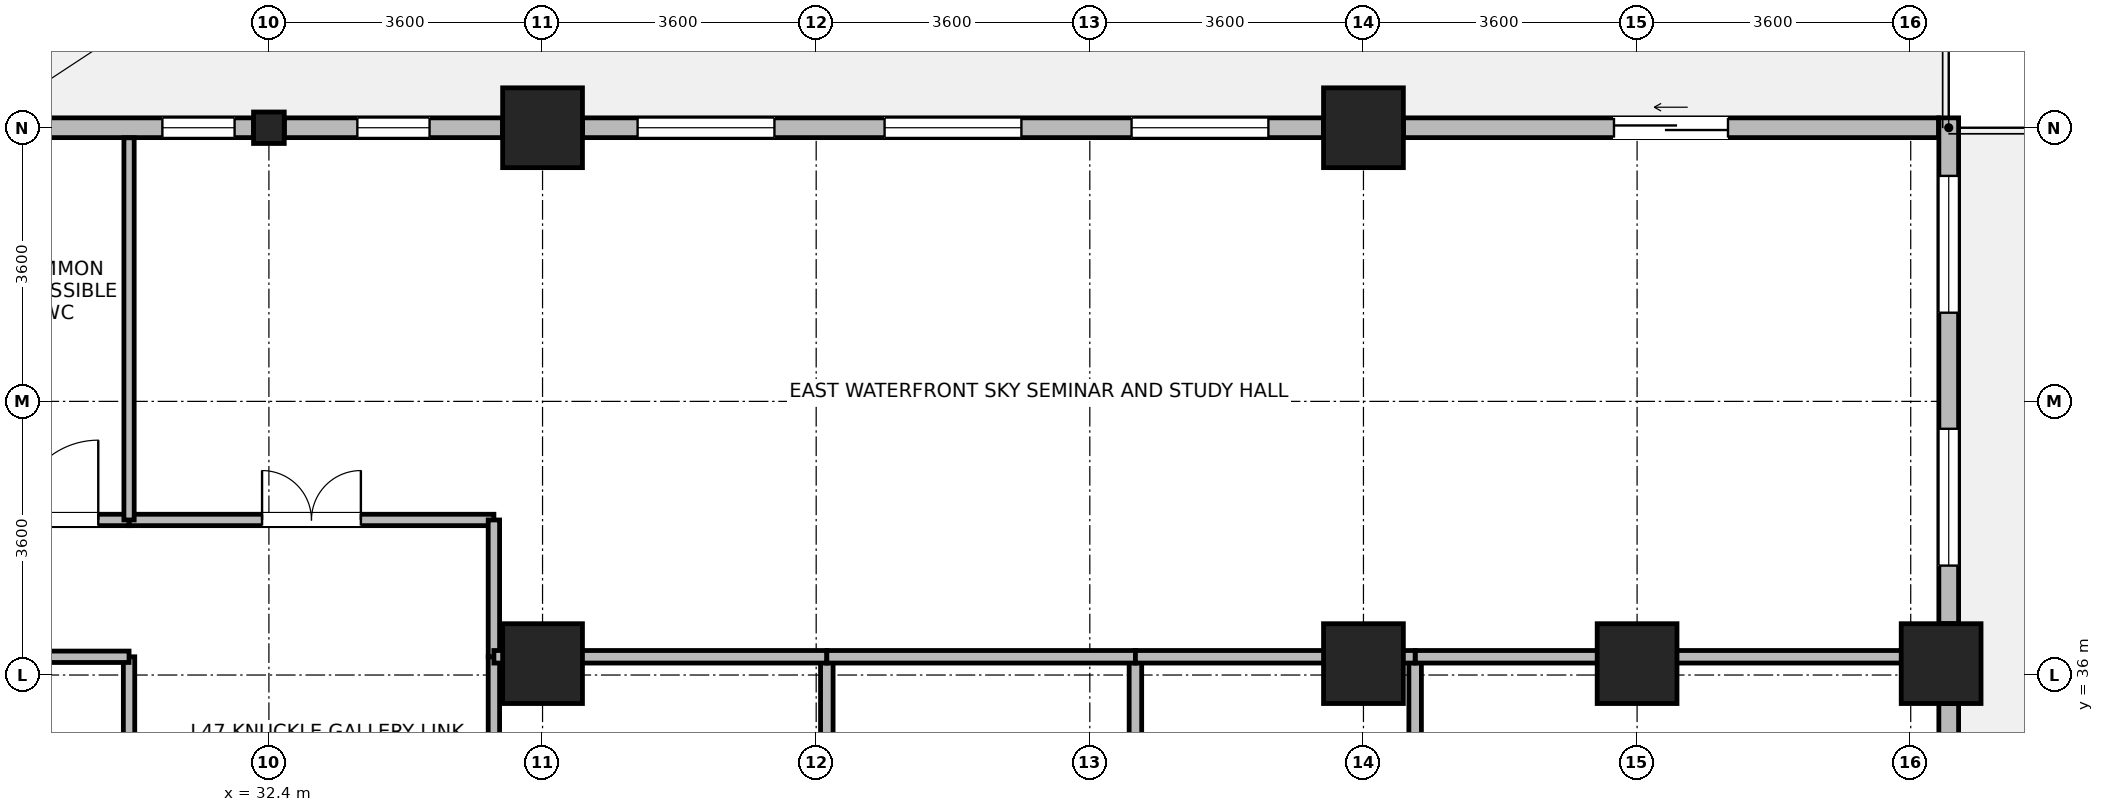
"""IFC4 building model, lengths in metres.
Left out: names, types, materials, properties, quantities, classifications, styles, units other than length and angle.
Written with IfcOpenShell. Run it as: python <this file> out.ifc"""

import sys

from ifc_helpers import new_model, si_unit, direction, frame, frame_2d, origin, origin_2d, place, context, subcontext, project, spatial, rectangle, i_section, extrude, source, transform, mapped, element, fill, save


model = new_model("IFC4")
c1 = context("Model", 3, precision=1e-05, world=origin(), true_north=direction((0.0, 1.0)))
c2 = subcontext(c1, "Body", "Model", "MODEL_VIEW")
j1 = project(units=[si_unit("LENGTHUNIT", "METRE"), si_unit("PLANEANGLEUNIT", "RADIAN")], contexts=[c1])
p1 = place(None, origin())
s1 = spatial("IfcSite", under=j1, at=p1, CompositionType="ELEMENT")
p2 = place(p1, origin())
s2 = spatial("IfcBuilding", under=s1, at=p2, CompositionType="ELEMENT")
p3 = place(p2, frame((0.0, 0.0, 184.6)))
s3 = spatial("IfcBuildingStorey", under=s2, at=p3, CompositionType="ELEMENT", Elevation=184.6)
m1 = source(origin(), c2, "Body", "SweptSolid", [
    extrude(rectangle(XDim=1.05, YDim=1.05, at=origin_2d()), origin(), (0.0, 0.0, 1.0), 3.7),
])
for number, where, z_axis, x_axis in (
    (1, (36.0, 43.2, 0.0), (0.0, 0.0, 1.0), (1.0, 0.0, 0.0)),
    (2, (36.0, 36.15, 0.0), (0.0, 0.0, 1.0), (1.0, 0.0, 0.0)),
    (3, (46.8, 36.15, 0.0), (0.0, 0.0, 1.0), (1.0, 0.0, 0.0)),
    (4, (46.8, 43.2, 0.0), (0.0, 0.0, 1.0), (1.0, 0.0, 0.0)),
    (5, (50.4, 36.15, 0.0), (0.0, 0.0, 1.0), (1.0, 0.0, 0.0)),
    (6, (54.4, 36.15, 0.0), (0.0, 0.0, 1.0), (1.0, 0.0, 0.0)),
):
    element("IfcColumn", number, at=place(p3, frame(where, z_axis=z_axis, x_axis=x_axis)), inside=s3, PredefinedType="COLUMN", context=c2, shape_type="MappedRepresentation", body=[
        mapped(m1, transform((0.0, 0.0, 0.0), x_axis=(1.0, 0.0, 0.0), y_axis=(0.0, 1.0, 0.0), z_axis=(0.0, 0.0, 1.0), scale=1.0)),
    ])
m2 = source(origin(), c2, "Body", "SweptSolid", [
    extrude(i_section(OverallWidth=0.404, OverallDepth=0.414, WebThickness=0.021, FlangeThickness=0.028, FilletRadius=0.015, at=origin_2d()), origin(), (0.0, 0.0, 1.0), 3.7),
])
p4 = place(p3, frame((32.4, 43.2, 0.0), z_axis=(0.0, 0.0, 1.0), x_axis=(1.0, 0.0, 0.0)))
e7 = element("IfcColumn", 7, at=p4, inside=s3, PredefinedType="COLUMN", context=c2, shape_type="MappedRepresentation", body=[
    mapped(m2, transform((0.0, 0.0, 0.0), x_axis=(1.0, 0.0, 0.0), y_axis=(0.0, 1.0, 0.0), z_axis=(0.0, 0.0, 1.0), scale=1.0)),
])
p5 = place(p3, frame((54.5, 35.624, 0.0), z_axis=(0.0, 0.0, 1.0), x_axis=(0.0, -1.0, 0.0)))
e8 = element("IfcWall", 8, at=p5, inside=s3, PredefinedType="STANDARD", context=c2, shape_type="SweptSolid", body=[
    extrude(rectangle(XDim=6.448, YDim=0.26, at=frame_2d((3.224, 0.0))), origin(), (0.0, 0.0, 1.0), 2.99),
])
p6 = place(p5, frame((0.712, 0.0, 0.85)))
e9 = element("IfcOpeningElement", 9, at=p6, cuts=e8, PredefinedType="OPENING", context=c2, shape_type="SweptSolid", body=[
    extrude(rectangle(XDim=1.8, YDim=1.85, at=frame_2d((0.9, 0.925))), frame((0.0, 0.14, 0.0), z_axis=(0.0, -1.0, 0.0), x_axis=(1.0, 0.0, 0.0)), (0.0, 0.0, 1.0), 0.28),
])
p7 = place(p5, frame((3.936, 0.0, 0.85)))
e10 = element("IfcOpeningElement", 10, at=p7, cuts=e8, PredefinedType="OPENING", context=c2, shape_type="SweptSolid", body=[
    extrude(rectangle(XDim=1.8, YDim=1.85, at=frame_2d((0.9, 0.925))), frame((0.0, 0.14, 0.0), z_axis=(0.0, -1.0, 0.0), x_axis=(1.0, 0.0, 0.0)), (0.0, 0.0, 1.0), 0.28),
])
p8 = place(p3, frame((54.5, 43.33, 0.0), z_axis=(0.0, 0.0, 1.0), x_axis=(0.0, -1.0, 0.0)))
e11 = element("IfcWall", 11, at=p8, inside=s3, PredefinedType="STANDARD", context=c2, shape_type="SweptSolid", body=[
    extrude(rectangle(XDim=6.654, YDim=0.26, at=frame_2d((3.327, 0.0))), origin(), (0.0, 0.0, 1.0), 3.44),
])
p9 = place(p8, frame((0.763, 0.0, 0.85)))
e12 = element("IfcOpeningElement", 12, at=p9, cuts=e11, PredefinedType="OPENING", context=c2, shape_type="SweptSolid", body=[
    extrude(rectangle(XDim=1.8, YDim=1.85, at=frame_2d((0.9, 0.925))), frame((0.0, 0.14, 0.0), z_axis=(0.0, -1.0, 0.0), x_axis=(1.0, 0.0, 0.0)), (0.0, 0.0, 1.0), 0.28),
])
p10 = place(p8, frame((4.091, 0.0, 0.85)))
e13 = element("IfcOpeningElement", 13, at=p10, cuts=e11, PredefinedType="OPENING", context=c2, shape_type="SweptSolid", body=[
    extrude(rectangle(XDim=1.8, YDim=1.85, at=frame_2d((0.9, 0.925))), frame((0.0, 0.14, 0.0), z_axis=(0.0, -1.0, 0.0), x_axis=(1.0, 0.0, 0.0)), (0.0, 0.0, 1.0), 0.28),
])
p11 = place(p3, frame((47.326, 43.2, 0.0), z_axis=(0.0, 0.0, 1.0), x_axis=(1.0, 0.0, 0.0)))
e14 = element("IfcWall", 14, at=p11, inside=s3, PredefinedType="STANDARD", context=c2, shape_type="SweptSolid", body=[
    extrude(rectangle(XDim=7.039, YDim=0.26, at=frame_2d((3.52, 0.0))), origin(), (0.0, 0.0, 1.0), 3.44),
])
p12 = place(p11, frame((2.77, 0.0, 0.0)))
e15 = element("IfcOpeningElement", 15, at=p12, cuts=e14, PredefinedType="OPENING", context=c2, shape_type="SweptSolid", body=[
    extrude(rectangle(XDim=1.5, YDim=2.15, at=frame_2d((0.75, 1.075))), frame((0.0, 0.14, 0.0), z_axis=(0.0, -1.0, 0.0), x_axis=(1.0, 0.0, 0.0)), (0.0, 0.0, 1.0), 0.28),
])
p13 = place(p3, frame((36.526, 43.2, 0.0), z_axis=(0.0, 0.0, 1.0), x_axis=(1.0, 0.0, 0.0)))
e16 = element("IfcWall", 16, at=p13, inside=s3, PredefinedType="STANDARD", context=c2, shape_type="SweptSolid", body=[
    extrude(rectangle(XDim=9.748, YDim=0.26, at=frame_2d((4.874, 0.0))), origin(), (0.0, 0.0, 1.0), 2.99),
])
p14 = place(p13, frame((0.725, 0.0, 0.85)))
e17 = element("IfcOpeningElement", 17, at=p14, cuts=e16, PredefinedType="OPENING", context=c2, shape_type="SweptSolid", body=[
    extrude(rectangle(XDim=1.8, YDim=1.85, at=frame_2d((0.9, 0.925))), frame((0.0, 0.14, 0.0), z_axis=(0.0, -1.0, 0.0), x_axis=(1.0, 0.0, 0.0)), (0.0, 0.0, 1.0), 0.28),
])
p15 = place(p13, frame((3.974, 0.0, 0.85)))
e18 = element("IfcOpeningElement", 18, at=p15, cuts=e16, PredefinedType="OPENING", context=c2, shape_type="SweptSolid", body=[
    extrude(rectangle(XDim=1.8, YDim=1.85, at=frame_2d((0.9, 0.925))), frame((0.0, 0.14, 0.0), z_axis=(0.0, -1.0, 0.0), x_axis=(1.0, 0.0, 0.0)), (0.0, 0.0, 1.0), 0.28),
])
p16 = place(p13, frame((7.223, 0.0, 0.85)))
e19 = element("IfcOpeningElement", 19, at=p16, cuts=e16, PredefinedType="OPENING", context=c2, shape_type="SweptSolid", body=[
    extrude(rectangle(XDim=1.8, YDim=1.85, at=frame_2d((0.9, 0.925))), frame((0.0, 0.14, 0.0), z_axis=(0.0, -1.0, 0.0), x_axis=(1.0, 0.0, 0.0)), (0.0, 0.0, 1.0), 0.28),
])
p17 = place(p3, frame((32.603, 43.2, 0.0), z_axis=(0.0, 0.0, 1.0), x_axis=(1.0, 0.0, 0.0)))
e20 = element("IfcWall", 20, at=p17, inside=s3, PredefinedType="STANDARD", context=c2, shape_type="SweptSolid", body=[
    extrude(rectangle(XDim=2.871, YDim=0.26, at=frame_2d((1.436, 0.0))), origin(), (0.0, 0.0, 1.0), 2.99),
])
p18 = place(p17, frame((0.96, 0.0, 0.85)))
e21 = element("IfcOpeningElement", 21, at=p18, cuts=e20, PredefinedType="OPENING", context=c2, shape_type="SweptSolid", body=[
    extrude(rectangle(XDim=0.95, YDim=1.75, at=frame_2d((0.475, 0.875))), frame((0.0, 0.14, 0.0), z_axis=(0.0, -1.0, 0.0), x_axis=(1.0, 0.0, 0.0)), (0.0, 0.0, 1.0), 0.28),
])
p19 = place(p3, frame((29.326, 43.2, 0.0), z_axis=(0.0, 0.0, 1.0), x_axis=(1.0, 0.0, 0.0)))
e22 = element("IfcWall", 22, at=p19, inside=s3, PredefinedType="STANDARD", context=c2, shape_type="SweptSolid", body=[
    extrude(rectangle(XDim=2.871, YDim=0.26, at=frame_2d((1.436, 0.0))), origin(), (0.0, 0.0, 1.0), 2.99),
])
p20 = place(p19, frame((1.673, 0.0, 0.85)))
e23 = element("IfcOpeningElement", 23, at=p20, cuts=e22, PredefinedType="OPENING", context=c2, shape_type="SweptSolid", body=[
    extrude(rectangle(XDim=0.95, YDim=1.75, at=frame_2d((0.475, 0.875))), frame((0.0, 0.14, 0.0), z_axis=(0.0, -1.0, 0.0), x_axis=(1.0, 0.0, 0.0)), (0.0, 0.0, 1.0), 0.28),
])
p21 = place(p3, frame((35.36, 28.56, 0.0), z_axis=(0.0, 0.0, 1.0), x_axis=(0.0, 1.0, 0.0)))
e24 = element("IfcWall", 24, at=p21, inside=s3, PredefinedType="PARTITIONING", context=c2, shape_type="SweptSolid", body=[
    extrude(rectangle(XDim=7.68, YDim=0.15, at=frame_2d((3.84, 0.0))), origin(), (0.0, 0.0, 1.0), 3.44),
])
p22 = place(p21, frame((3.19, 0.0, 0.0)))
e25 = element("IfcOpeningElement", 25, at=p22, cuts=e24, PredefinedType="OPENING", context=c2, shape_type="SweptSolid", body=[
    extrude(rectangle(XDim=1.3, YDim=2.12, at=frame_2d((0.65, 1.06))), frame((0.0, 0.085, 0.0), z_axis=(0.0, -1.0, 0.0), x_axis=(1.0, 0.0, 0.0)), (0.0, 0.0, 1.0), 0.17),
])
p23 = place(p3, frame((30.56, 38.04, 0.0), z_axis=(0.0, 0.0, 1.0), x_axis=(1.0, 0.0, 0.0)))
e26 = element("IfcWall", 26, at=p23, inside=s3, PredefinedType="PARTITIONING", context=c2, shape_type="SweptSolid", body=[
    extrude(rectangle(XDim=4.8, YDim=0.15, at=frame_2d((2.4, 0.0))), origin(), (0.0, 0.0, 1.0), 3.44),
])
p24 = place(p23, frame((1.75, 0.0, 0.0)))
e27 = element("IfcOpeningElement", 27, at=p24, cuts=e26, PredefinedType="OPENING", context=c2, shape_type="SweptSolid", body=[
    extrude(rectangle(XDim=1.3, YDim=2.12, at=frame_2d((0.65, 1.06))), frame((0.0, 0.085, 0.0), z_axis=(0.0, -1.0, 0.0), x_axis=(1.0, 0.0, 0.0)), (0.0, 0.0, 1.0), 0.17),
])
p25 = place(p3, frame((30.56, 31.64, 0.0), z_axis=(0.0, 0.0, 1.0), x_axis=(0.0, 1.0, 0.0)))
e28 = element("IfcWall", 28, at=p25, inside=s3, PredefinedType="PARTITIONING", context=c2, shape_type="SweptSolid", body=[
    extrude(rectangle(XDim=4.6, YDim=0.15, at=frame_2d((2.3, 0.0))), origin(), (0.0, 0.0, 1.0), 3.44),
])
p26 = place(p25, frame((1.65, 0.0, 0.0)))
e29 = element("IfcOpeningElement", 29, at=p26, cuts=e28, PredefinedType="OPENING", context=c2, shape_type="SweptSolid", body=[
    extrude(rectangle(XDim=1.3, YDim=2.12, at=frame_2d((0.65, 1.06))), frame((0.0, 0.085, 0.0), z_axis=(0.0, -1.0, 0.0), x_axis=(1.0, 0.0, 0.0)), (0.0, 0.0, 1.0), 0.17),
])
p27 = place(p3, frame((28.7, 38.04, 0.0), z_axis=(0.0, 0.0, 1.0), x_axis=(1.0, 0.0, 0.0)))
e30 = element("IfcWall", 30, at=p27, inside=s3, PredefinedType="PARTITIONING", context=c2, shape_type="SweptSolid", body=[
    extrude(rectangle(XDim=1.86, YDim=0.15, at=frame_2d((0.93, 0.0))), origin(), (0.0, 0.0, 1.0), 3.44),
])
p28 = place(p27, frame((0.405, 0.0, 0.0)))
e31 = element("IfcOpeningElement", 31, at=p28, cuts=e30, PredefinedType="OPENING", context=c2, shape_type="SweptSolid", body=[
    extrude(rectangle(XDim=1.05, YDim=2.12, at=frame_2d((0.525, 1.06))), frame((0.0, 0.085, 0.0), z_axis=(0.0, -1.0, 0.0), x_axis=(1.0, 0.0, 0.0)), (0.0, 0.0, 1.0), 0.17),
])
p29 = place(p3, frame((35.36, 36.24, 0.0), z_axis=(0.0, 0.0, 1.0), x_axis=(0.0, 1.0, 0.0)))
e32 = element("IfcWall", 32, at=p29, inside=s3, PredefinedType="PARTITIONING", context=c2, shape_type="SweptSolid", body=[
    extrude(rectangle(XDim=1.8, YDim=0.15, at=frame_2d((0.9, 0.0))), origin(), (0.0, 0.0, 1.0), 3.44),
])
p30 = place(p3, frame((29.325, 36.24, 0.0), z_axis=(0.0, 0.0, 1.0), x_axis=(1.0, 0.0, 0.0)))
e33 = element("IfcWall", 33, at=p30, inside=s3, PredefinedType="PARTITIONING", context=c2, shape_type="SweptSolid", body=[
    extrude(rectangle(XDim=1.235, YDim=0.15, at=frame_2d((0.618, 0.0))), origin(), (0.0, 0.0, 1.0), 2.84),
])
for number, where, z_axis, x_axis in (
    (34, (39.74, 28.56, 0.0), (0.0, 0.0, 1.0), (0.0, 1.0, 0.0)),
    (35, (43.8, 28.56, 0.0), (0.0, 0.0, 1.0), (0.0, 1.0, 0.0)),
    (36, (47.48, 28.56, 0.0), (0.0, 0.0, 1.0), (0.0, 1.0, 0.0)),
):
    element("IfcWall", number, at=place(p3, frame(where, z_axis=z_axis, x_axis=x_axis)), inside=s3, PredefinedType="PARTITIONING", context=c2, shape_type="SweptSolid", body=[
        extrude(rectangle(XDim=7.68, YDim=0.165, at=frame_2d((3.84, 0.0))), origin(), (0.0, 0.0, 1.0), 3.44),
    ])
p31 = place(p3, frame((47.48, 36.24, 0.0), z_axis=(0.0, 0.0, 1.0), x_axis=(1.0, 0.0, 0.0)))
e37 = element("IfcWall", 37, at=p31, inside=s3, PredefinedType="PARTITIONING", context=c2, shape_type="SweptSolid", body=[
    extrude(rectangle(XDim=6.888, YDim=0.165, at=frame_2d((3.444, 0.0))), origin(), (0.0, 0.0, 1.0), 2.84),
])
p32 = place(p3, frame((30.56, 38.04, 0.0), z_axis=(0.0, 0.0, 1.0), x_axis=(0.0, 1.0, 0.0)))
e38 = element("IfcWall", 38, at=p32, inside=s3, PredefinedType="PARTITIONING", context=c2, shape_type="SweptSolid", body=[
    extrude(rectangle(XDim=5.028, YDim=0.135, at=frame_2d((2.514, 0.0))), origin(), (0.0, 0.0, 1.0), 3.44),
])
p33 = place(p3, frame((35.36, 36.24, 0.0), z_axis=(0.0, 0.0, 1.0), x_axis=(1.0, 0.0, 0.0)))
e39 = element("IfcWall", 39, at=p33, inside=s3, PredefinedType="PARTITIONING", context=c2, shape_type="SweptSolid", body=[
    extrude(rectangle(XDim=4.38, YDim=0.165, at=frame_2d((2.19, 0.0))), origin(), (0.0, 0.0, 1.0), 2.84),
])
p34 = place(p3, frame((39.74, 36.24, 0.0), z_axis=(0.0, 0.0, 1.0), x_axis=(1.0, 0.0, 0.0)))
e40 = element("IfcWall", 40, at=p34, inside=s3, PredefinedType="PARTITIONING", context=c2, shape_type="SweptSolid", body=[
    extrude(rectangle(XDim=4.06, YDim=0.165, at=frame_2d((2.03, 0.0))), origin(), (0.0, 0.0, 1.0), 2.84),
])
p35 = place(p3, frame((43.8, 36.24, 0.0), z_axis=(0.0, 0.0, 1.0), x_axis=(1.0, 0.0, 0.0)))
e41 = element("IfcWall", 41, at=p35, inside=s3, PredefinedType="PARTITIONING", context=c2, shape_type="SweptSolid", body=[
    extrude(rectangle(XDim=3.68, YDim=0.165, at=frame_2d((1.84, 0.0))), origin(), (0.0, 0.0, 1.0), 2.84),
])
p36 = place(p9, origin())
e42 = element("IfcWindow", 42, at=p36, inside=s3, PartitioningType="SINGLE_PANEL", PredefinedType="WINDOW", context=c2, shape_type="SweptSolid", body=[
    extrude(rectangle(XDim=1.8, YDim=1.85, at=frame_2d((0.9, 0.925))), frame((0.0, 0.03, 0.0), z_axis=(0.0, -1.0, 0.0), x_axis=(1.0, 0.0, 0.0)), (0.0, 0.0, 1.0), 0.06),
])
fill(e12, e42)
p37 = place(p10, origin())
e43 = element("IfcWindow", 43, at=p37, inside=s3, PartitioningType="SINGLE_PANEL", PredefinedType="WINDOW", context=c2, shape_type="SweptSolid", body=[
    extrude(rectangle(XDim=1.8, YDim=1.85, at=frame_2d((0.9, 0.925))), frame((0.0, 0.03, 0.0), z_axis=(0.0, -1.0, 0.0), x_axis=(1.0, 0.0, 0.0)), (0.0, 0.0, 1.0), 0.06),
])
fill(e13, e43)
p38 = place(p12, origin())
e44 = element("IfcDoor", 44, at=p38, inside=s3, OperationType="SLIDING_TO_LEFT", PredefinedType="DOOR", context=c2, shape_type="SweptSolid", body=[
    extrude(rectangle(XDim=1.5, YDim=2.15, at=frame_2d((0.75, 1.075))), frame((0.0, 0.025, 0.0), z_axis=(0.0, -1.0, 0.0), x_axis=(1.0, 0.0, 0.0)), (0.0, 0.0, 1.0), 0.05),
])
fill(e15, e44)
p39 = place(p14, origin())
e45 = element("IfcWindow", 45, at=p39, inside=s3, PartitioningType="SINGLE_PANEL", PredefinedType="WINDOW", context=c2, shape_type="SweptSolid", body=[
    extrude(rectangle(XDim=1.8, YDim=1.85, at=frame_2d((0.9, 0.925))), frame((0.0, 0.03, 0.0), z_axis=(0.0, -1.0, 0.0), x_axis=(1.0, 0.0, 0.0)), (0.0, 0.0, 1.0), 0.06),
])
fill(e17, e45)
p40 = place(p15, origin())
e46 = element("IfcWindow", 46, at=p40, inside=s3, PartitioningType="SINGLE_PANEL", PredefinedType="WINDOW", context=c2, shape_type="SweptSolid", body=[
    extrude(rectangle(XDim=1.8, YDim=1.85, at=frame_2d((0.9, 0.925))), frame((0.0, 0.03, 0.0), z_axis=(0.0, -1.0, 0.0), x_axis=(1.0, 0.0, 0.0)), (0.0, 0.0, 1.0), 0.06),
])
fill(e18, e46)
p41 = place(p16, origin())
e47 = element("IfcWindow", 47, at=p41, inside=s3, PartitioningType="SINGLE_PANEL", PredefinedType="WINDOW", context=c2, shape_type="SweptSolid", body=[
    extrude(rectangle(XDim=1.8, YDim=1.85, at=frame_2d((0.9, 0.925))), frame((0.0, 0.03, 0.0), z_axis=(0.0, -1.0, 0.0), x_axis=(1.0, 0.0, 0.0)), (0.0, 0.0, 1.0), 0.06),
])
fill(e19, e47)
p42 = place(p18, origin())
e48 = element("IfcWindow", 48, at=p42, inside=s3, PartitioningType="SINGLE_PANEL", PredefinedType="WINDOW", context=c2, shape_type="SweptSolid", body=[
    extrude(rectangle(XDim=0.95, YDim=1.75, at=frame_2d((0.475, 0.875))), frame((0.0, 0.03, 0.0), z_axis=(0.0, -1.0, 0.0), x_axis=(1.0, 0.0, 0.0)), (0.0, 0.0, 1.0), 0.06),
])
fill(e21, e48)
p43 = place(p20, origin())
e49 = element("IfcWindow", 49, at=p43, inside=s3, PartitioningType="SINGLE_PANEL", PredefinedType="WINDOW", context=c2, shape_type="SweptSolid", body=[
    extrude(rectangle(XDim=0.95, YDim=1.75, at=frame_2d((0.475, 0.875))), frame((0.0, 0.03, 0.0), z_axis=(0.0, -1.0, 0.0), x_axis=(1.0, 0.0, 0.0)), (0.0, 0.0, 1.0), 0.06),
])
fill(e23, e49)
p44 = place(p24, origin())
e50 = element("IfcDoor", 50, at=p44, inside=s3, OperationType="DOUBLE_DOOR_SINGLE_SWING", PredefinedType="DOOR", context=c2, shape_type="SweptSolid", body=[
    extrude(rectangle(XDim=1.3, YDim=2.12, at=frame_2d((0.65, 1.06))), frame((0.0, 0.025, 0.0), z_axis=(0.0, -1.0, 0.0), x_axis=(1.0, 0.0, 0.0)), (0.0, 0.0, 1.0), 0.05),
])
fill(e27, e50)
p45 = place(p28, origin())
e51 = element("IfcDoor", 51, at=p45, inside=s3, OperationType="SINGLE_SWING_RIGHT", PredefinedType="DOOR", context=c2, shape_type="SweptSolid", body=[
    extrude(rectangle(XDim=1.05, YDim=2.12, at=frame_2d((0.525, 1.06))), frame((0.0, 0.025, 0.0), z_axis=(0.0, -1.0, 0.0), x_axis=(1.0, 0.0, 0.0)), (0.0, 0.0, 1.0), 0.05),
])
fill(e31, e51)
save(model, sys.argv[1])
